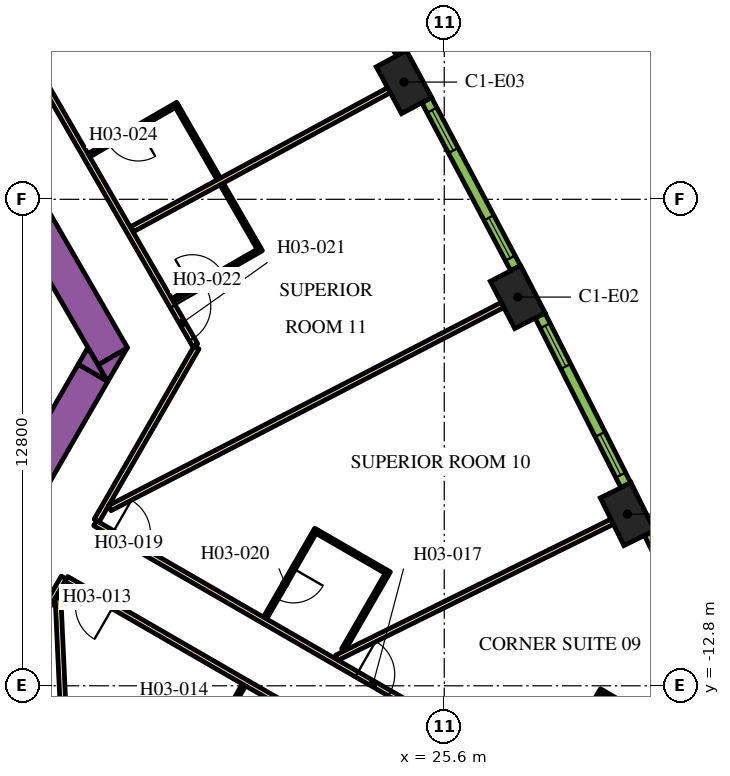
"""IFC4 building model, lengths in metres.
Left out: names, types, materials, properties, quantities, classifications, styles, units other than length and angle.
Written with IfcOpenShell. Run it as: python <this file> out.ifc"""

import sys

from ifc_helpers import new_model, si_unit, direction, frame, frame_2d, origin, origin_2d, place, context, subcontext, project, spatial, polyline, rectangle, outline, extrude, element, fill, save


model = new_model("IFC4")
c1 = context("Model", 3, precision=1e-05, world=origin(), true_north=direction((0.0, 1.0)))
c2 = subcontext(c1, "Body", "Model", "MODEL_VIEW")
j1 = project(units=[si_unit("LENGTHUNIT", "METRE"), si_unit("PLANEANGLEUNIT", "RADIAN")], contexts=[c1])
p1 = place(None, origin())
s1 = spatial("IfcSite", under=j1, at=p1, CompositionType="ELEMENT")
p2 = place(p1, origin())
s2 = spatial("IfcBuilding", under=s1, at=p2, CompositionType="ELEMENT")
p3 = place(p2, frame((0.0, 0.0, 51.0)))
s3 = spatial("IfcBuildingStorey", under=s2, at=p3, CompositionType="ELEMENT", Elevation=51.0)
for number, where, z_axis, x_axis in (
    (1, (30.421, -8.284, 0.0), (0.0, 0.0, 1.0), (-0.443, 0.897, 0.0)),
    (2, (27.533, -2.572, 0.0), (0.0, 0.0, 1.0), (-0.459, 0.888, 0.0)),
    (3, (24.54, 3.085, 0.0), (0.0, 0.0, 1.0), (-0.476, 0.88, 0.0)),
):
    element("IfcColumn", number, at=place(p3, frame(where, z_axis=z_axis, x_axis=x_axis)), inside=s3, PredefinedType="COLUMN", context=c2, shape_type="SweptSolid", body=[
        extrude(rectangle(XDim=1.4, YDim=0.9, at=origin_2d()), origin(), (0.0, 0.0, 1.0), 3.9),
    ])
p4 = place(p3, frame((6.776, 13.364, 0.0), z_axis=(0.0, 0.0, 1.0), x_axis=(0.500004177138, -0.8660229921, 0.0)))
e4 = element("IfcWall", 4, at=p4, inside=s3, PredefinedType="SOLIDWALL", context=c2, shape_type="SweptSolid", body=[
    extrude(rectangle(XDim=20.204, YDim=0.9, at=frame_2d((10.102, 0.0))), origin(), (0.0, 0.0, 1.0), 3.9),
])
p5 = place(p3, origin())
e5 = element("IfcWall", 5, at=p5, inside=s3, PredefinedType="SOLIDWALL", context=c2, shape_type="SweptSolid", body=[
    extrude(outline(polyline([(16.743, -4.8), (16.489, -4.36), (17.251, -3.92), (16.743, -4.8)])), origin(), (0.0, 0.0, 1.0), 3.9),
])
p6 = place(p3, frame((11.943, -12.214, 0.0), z_axis=(0.0, 0.0, 1.0), x_axis=(0.49998092645, 0.866036415623, 0.0)))
e6 = element("IfcWall", 6, at=p6, inside=s3, PredefinedType="SOLIDWALL", context=c2, shape_type="SweptSolid", body=[
    extrude(rectangle(XDim=8.83, YDim=0.9, at=frame_2d((4.415, 0.0))), origin(), (0.0, 0.0, 1.0), 3.9),
])
e7 = element("IfcWall", 7, at=p5, inside=s3, PredefinedType="SOLIDWALL", context=c2, shape_type="SweptSolid", body=[
    extrude(outline(polyline([(16.223, -3.9), (16.732, -4.78), (15.969, -4.34), (16.223, -3.9)])), origin(), (0.0, 0.0, 1.0), 3.9),
])
p7 = place(p3, frame((16.412, -8.523, 0.0), z_axis=(0.0, 0.0, 1.0), x_axis=(0.866022197818, -0.500005552856, 0.0)))
e8 = element("IfcWall", 8, at=p7, inside=s3, PredefinedType="PARTITIONING", context=c2, shape_type="SweptSolid", body=[
    extrude(rectangle(XDim=16.224, YDim=0.15, at=frame_2d((8.112, 0.0))), origin(), (0.0, 0.0, 1.0), 2.75),
])
p8 = place(p7, frame((7.949, 0.0, 0.0)))
e9 = element("IfcOpeningElement", 9, at=p8, cuts=e8, PredefinedType="OPENING", context=c2, shape_type="SweptSolid", body=[
    extrude(rectangle(XDim=1.0, YDim=2.1, at=frame_2d((0.5, 1.05))), frame((0.0, 0.085, 0.0), z_axis=(0.0, -1.0, 0.0), x_axis=(1.0, 0.0, 0.0)), (0.0, 0.0, 1.0), 0.17),
])
p9 = place(p7, frame((0.526, 0.0, 0.0)))
e10 = element("IfcOpeningElement", 10, at=p9, cuts=e8, PredefinedType="OPENING", context=c2, shape_type="SweptSolid", body=[
    extrude(rectangle(XDim=1.0, YDim=2.1, at=frame_2d((0.5, 1.05))), frame((0.0, 0.085, 0.0), z_axis=(0.0, -1.0, 0.0), x_axis=(1.0, 0.0, 0.0)), (0.0, 0.0, 1.0), 0.17),
])
p10 = place(p3, frame((19.081, -3.9, 0.0), z_axis=(0.0, 0.0, 1.0), x_axis=(-0.499974327079, -0.866040225545, 0.0)))
e11 = element("IfcWall", 11, at=p10, inside=s3, PredefinedType="PARTITIONING", context=c2, shape_type="SweptSolid", body=[
    extrude(rectangle(XDim=5.258, YDim=0.15, at=frame_2d((2.629, 0.0))), origin(), (0.0, 0.0, 1.0), 2.75),
])
p11 = place(p3, frame((6.163, 18.475, 0.0), z_axis=(0.0, 0.0, 1.0), x_axis=(0.500001317485, -0.866024643133, 0.0)))
e12 = element("IfcWall", 12, at=p11, inside=s3, PredefinedType="PARTITIONING", context=c2, shape_type="SweptSolid", body=[
    extrude(rectangle(XDim=25.767, YDim=0.15, at=frame_2d((12.883, 0.0))), origin(), (0.0, 0.0, 1.0), 2.75),
])
p12 = place(p11, frame((24.586, 0.0, 0.0)))
e13 = element("IfcOpeningElement", 13, at=p12, cuts=e12, PredefinedType="OPENING", context=c2, shape_type="SweptSolid", body=[
    extrude(rectangle(XDim=1.0, YDim=2.1, at=frame_2d((0.5, 1.05))), frame((0.0, 0.085, 0.0), z_axis=(0.0, -1.0, 0.0), x_axis=(1.0, 0.0, 0.0)), (0.0, 0.0, 1.0), 0.17),
])
p13 = place(p11, frame((13.144, 0.0, 0.0)))
e14 = element("IfcOpeningElement", 14, at=p13, cuts=e12, PredefinedType="OPENING", context=c2, shape_type="SweptSolid", body=[
    extrude(rectangle(XDim=1.0, YDim=2.1, at=frame_2d((0.5, 1.05))), frame((0.0, 0.085, 0.0), z_axis=(0.0, -1.0, 0.0), x_axis=(1.0, 0.0, 0.0)), (0.0, 0.0, 1.0), 0.17),
])
p14 = place(p11, frame((11.692, 0.0, 0.0)))
e15 = element("IfcOpeningElement", 15, at=p14, cuts=e12, PredefinedType="OPENING", context=c2, shape_type="SweptSolid", body=[
    extrude(rectangle(XDim=1.0, YDim=2.1, at=frame_2d((0.5, 1.05))), frame((0.0, 0.085, 0.0), z_axis=(0.0, -1.0, 0.0), x_axis=(1.0, 0.0, 0.0)), (0.0, 0.0, 1.0), 0.17),
])
p15 = place(p11, frame((0.572, 0.0, 0.0)))
e16 = element("IfcOpeningElement", 16, at=p15, cuts=e12, PredefinedType="OPENING", context=c2, shape_type="SweptSolid", body=[
    extrude(rectangle(XDim=1.0, YDim=2.1, at=frame_2d((0.5, 1.05))), frame((0.0, 0.085, 0.0), z_axis=(0.0, -1.0, 0.0), x_axis=(1.0, 0.0, 0.0)), (0.0, 0.0, 1.0), 0.17),
])
p16 = place(p3, frame((15.587, -9.952, 0.0), z_axis=(0.0, 0.0, 1.0), x_axis=(-0.500016618951, -0.866015808616, 0.0)))
e17 = element("IfcWall", 17, at=p16, inside=s3, PredefinedType="PARTITIONING", context=c2, shape_type="SweptSolid", body=[
    extrude(rectangle(XDim=5.268, YDim=0.15, at=frame_2d((2.634, 0.0))), origin(), (0.0, 0.0, 1.0), 2.75),
])
p17 = place(p3, frame((29.638, -18.064, 0.0), z_axis=(0.0, 0.0, 1.0), x_axis=(-0.866026175601, 0.499998663172, 0.0)))
e18 = element("IfcWall", 18, at=p17, inside=s3, PredefinedType="PARTITIONING", context=c2, shape_type="SweptSolid", body=[
    extrude(rectangle(XDim=16.144, YDim=0.15, at=frame_2d((8.072, 0.0))), origin(), (0.0, 0.0, 1.0), 2.75),
])
p18 = place(p17, frame((14.714, 0.0, 0.0)))
e19 = element("IfcOpeningElement", 19, at=p18, cuts=e18, PredefinedType="OPENING", context=c2, shape_type="SweptSolid", body=[
    extrude(rectangle(XDim=1.0, YDim=2.1, at=frame_2d((0.5, 1.05))), frame((0.0, 0.085, 0.0), z_axis=(0.0, -1.0, 0.0), x_axis=(1.0, 0.0, 0.0)), (0.0, 0.0, 1.0), 0.17),
])
p19 = place(p17, frame((7.275, 0.0, 0.0)))
e20 = element("IfcOpeningElement", 20, at=p19, cuts=e18, PredefinedType="OPENING", context=c2, shape_type="SweptSolid", body=[
    extrude(rectangle(XDim=1.0, YDim=2.1, at=frame_2d((0.5, 1.05))), frame((0.0, 0.085, 0.0), z_axis=(0.0, -1.0, 0.0), x_axis=(1.0, 0.0, 0.0)), (0.0, 0.0, 1.0), 0.17),
])
p20 = place(p3, frame((15.973, -22.109, 0.0), z_axis=(0.0, 0.0, 1.0), x_axis=(-0.046191717129, 0.998932592955, 0.0)))
e21 = element("IfcWall", 21, at=p20, inside=s3, PredefinedType="PARTITIONING", context=c2, shape_type="SweptSolid", body=[
    extrude(rectangle(XDim=11.638, YDim=0.15, at=frame_2d((5.819, 0.0))), origin(), (0.0, 0.0, 1.0), 2.75),
])
p21 = place(p3, frame((27.134, -2.779, 0.0), z_axis=(0.0, 0.0, 1.0), x_axis=(-0.8882049501, -0.459447457951, 0.0)))
e22 = element("IfcWall", 22, at=p21, inside=s3, PredefinedType="PARTITIONING", context=c2, shape_type="SweptSolid", body=[
    extrude(rectangle(XDim=11.638, YDim=0.15, at=frame_2d((5.819, 0.0))), origin(), (0.0, 0.0, 1.0), 2.75),
])
p22 = place(p3, frame((24.145, 2.871, 0.0), z_axis=(0.0, 0.0, 1.0), x_axis=(-0.879551725039, -0.475803281809, 0.0)))
e23 = element("IfcWall", 23, at=p22, inside=s3, PredefinedType="PARTITIONING", context=c2, shape_type="SweptSolid", body=[
    extrude(rectangle(XDim=7.688, YDim=0.15, at=frame_2d((3.844, 0.0))), origin(), (0.0, 0.0, 1.0), 2.75),
])
p23 = place(p3, frame((30.018, -8.483, 0.0), z_axis=(0.0, 0.0, 1.0), x_axis=(-0.896544505264, -0.44295366584, 0.0)))
e24 = element("IfcWall", 24, at=p23, inside=s3, PredefinedType="PARTITIONING", context=c2, shape_type="SweptSolid", body=[
    extrude(rectangle(XDim=8.079, YDim=0.15, at=frame_2d((4.04, 0.0))), origin(), (0.0, 0.0, 1.0), 2.75),
])
p24 = place(p3, frame((20.33, -12.777, 0.0), z_axis=(0.0, 0.0, 1.0), x_axis=(-0.500006934395, -0.866021400173, 0.0)))
e25 = element("IfcWall", 25, at=p24, inside=s3, PredefinedType="PARTITIONING", context=c2, shape_type="SweptSolid", body=[
    extrude(rectangle(XDim=2.6, YDim=0.1, at=frame_2d((1.3, 0.0))), origin(), (0.0, 0.0, 1.0), 2.75),
])
p25 = place(p24, frame((0.6, 0.0, 0.0)))
e26 = element("IfcOpeningElement", 26, at=p25, cuts=e25, PredefinedType="OPENING", context=c2, shape_type="SweptSolid", body=[
    extrude(rectangle(XDim=0.9, YDim=2.1, at=frame_2d((0.45, 1.05))), frame((0.0, 0.06, 0.0), z_axis=(0.0, -1.0, 0.0), x_axis=(1.0, 0.0, 0.0)), (0.0, 0.0, 1.0), 0.12),
])
p26 = place(p3, frame((29.752, -12.905, 0.0), z_axis=(0.0, 0.0, 1.0), x_axis=(-0.500049511043, -0.865996816683, 0.0)))
e27 = element("IfcWall", 27, at=p26, inside=s3, PredefinedType="PARTITIONING", context=c2, shape_type="SweptSolid", body=[
    extrude(rectangle(XDim=2.8, YDim=0.1, at=frame_2d((1.4, 0.0))), origin(), (0.0, 0.0, 1.0), 2.75),
])
p27 = place(p26, frame((1.3, 0.0, 0.0)))
e28 = element("IfcOpeningElement", 28, at=p27, cuts=e27, PredefinedType="OPENING", context=c2, shape_type="SweptSolid", body=[
    extrude(rectangle(XDim=0.9, YDim=2.1, at=frame_2d((0.45, 1.05))), frame((0.0, 0.06, 0.0), z_axis=(0.0, -1.0, 0.0), x_axis=(1.0, 0.0, 0.0)), (0.0, 0.0, 1.0), 0.12),
])
p28 = place(p3, frame((29.771, -12.973, 0.0), z_axis=(0.0, 0.0, 1.0), x_axis=(0.865980596518, -0.500077600433, 0.0)))
e29 = element("IfcWall", 29, at=p28, inside=s3, PredefinedType="PARTITIONING", context=c2, shape_type="SweptSolid", body=[
    extrude(rectangle(XDim=2.4, YDim=0.1, at=frame_2d((1.2, 0.0))), origin(), (0.0, 0.0, 1.0), 2.75),
])
p29 = place(p3, frame((22.234, -8.68, 0.0), z_axis=(0.0, 0.0, 1.0), x_axis=(-0.50000943426, -0.866019956843, 0.0)))
e30 = element("IfcWall", 30, at=p29, inside=s3, PredefinedType="PARTITIONING", context=c2, shape_type="SweptSolid", body=[
    extrude(rectangle(XDim=2.7, YDim=0.1, at=frame_2d((1.35, 0.0))), origin(), (0.0, 0.0, 1.0), 2.75),
])
p30 = place(p29, frame((1.2, 0.0, 0.0)))
e31 = element("IfcOpeningElement", 31, at=p30, cuts=e30, PredefinedType="OPENING", context=c2, shape_type="SweptSolid", body=[
    extrude(rectangle(XDim=0.9, YDim=2.1, at=frame_2d((0.45, 1.05))), frame((0.0, 0.06, 0.0), z_axis=(0.0, -1.0, 0.0), x_axis=(1.0, 0.0, 0.0)), (0.0, 0.0, 1.0), 0.12),
])
p31 = place(p3, frame((22.252, -8.748, 0.0), z_axis=(0.0, 0.0, 1.0), x_axis=(0.866009402589, -0.500027713859, 0.0)))
e32 = element("IfcWall", 32, at=p31, inside=s3, PredefinedType="PARTITIONING", context=c2, shape_type="SweptSolid", body=[
    extrude(rectangle(XDim=2.1, YDim=0.1, at=frame_2d((1.05, 0.0))), origin(), (0.0, 0.0, 1.0), 2.75),
])
p32 = place(p3, frame((22.944, -11.85, 0.0), z_axis=(0.0, 0.0, 1.0), x_axis=(0.499940577336, 0.866059708757, 0.0)))
e33 = element("IfcWall", 33, at=p32, inside=s3, PredefinedType="PARTITIONING", context=c2, shape_type="SweptSolid", body=[
    extrude(rectangle(XDim=2.39, YDim=0.1, at=frame_2d((1.195, 0.0))), origin(), (0.0, 0.0, 1.0), 2.75),
])
p33 = place(p3, frame((18.451, -2.657, 0.0), z_axis=(0.0, 0.0, 1.0), x_axis=(0.86599734893, 0.500048589285, 0.0)))
e34 = element("IfcWall", 34, at=p33, inside=s3, PredefinedType="PARTITIONING", context=c2, shape_type="SweptSolid", body=[
    extrude(rectangle(XDim=2.7, YDim=0.1, at=frame_2d((1.35, 0.0))), origin(), (0.0, 0.0, 1.0), 2.75),
])
p34 = place(p33, frame((0.6, 0.0, 0.0)))
e35 = element("IfcOpeningElement", 35, at=p34, cuts=e34, PredefinedType="OPENING", context=c2, shape_type="SweptSolid", body=[
    extrude(rectangle(XDim=0.9, YDim=2.1, at=frame_2d((0.45, 1.05))), frame((0.0, 0.06, 0.0), z_axis=(0.0, -1.0, 0.0), x_axis=(1.0, 0.0, 0.0)), (0.0, 0.0, 1.0), 0.12),
])
p35 = place(p3, frame((20.716, -1.281, 0.0), z_axis=(0.0, 0.0, 1.0), x_axis=(-0.499969367985, 0.866043088465, 0.0)))
e36 = element("IfcWall", 36, at=p35, inside=s3, PredefinedType="PARTITIONING", context=c2, shape_type="SweptSolid", body=[
    extrude(rectangle(XDim=1.94, YDim=0.1, at=frame_2d((0.97, 0.0))), origin(), (0.0, 0.0, 1.0), 2.75),
])
p36 = place(p3, frame((18.586, 2.509, 0.0), z_axis=(0.0, 0.0, 1.0), x_axis=(-0.866059108428, -0.4999416173, 0.0)))
e37 = element("IfcWall", 37, at=p36, inside=s3, PredefinedType="PARTITIONING", context=c2, shape_type="SweptSolid", body=[
    extrude(rectangle(XDim=2.7, YDim=0.1, at=frame_2d((1.35, 0.0))), origin(), (0.0, 0.0, 1.0), 2.75),
])
p37 = place(p36, frame((1.2, 0.0, 0.0)))
e38 = element("IfcOpeningElement", 38, at=p37, cuts=e37, PredefinedType="OPENING", context=c2, shape_type="SweptSolid", body=[
    extrude(rectangle(XDim=0.9, YDim=2.1, at=frame_2d((0.45, 1.05))), frame((0.0, 0.06, 0.0), z_axis=(0.0, -1.0, 0.0), x_axis=(1.0, 0.0, 0.0)), (0.0, 0.0, 1.0), 0.12),
])
p38 = place(p3, frame((18.567, 2.441, 0.0), z_axis=(0.0, 0.0, 1.0), x_axis=(0.499946605688, -0.86605622881, 0.0)))
e39 = element("IfcWall", 39, at=p38, inside=s3, PredefinedType="PARTITIONING", context=c2, shape_type="SweptSolid", body=[
    extrude(rectangle(XDim=2.2, YDim=0.1, at=frame_2d((1.1, 0.0))), origin(), (0.0, 0.0, 1.0), 2.75),
])
p39 = place(p3, frame((33.176, -13.29, 0.0), z_axis=(0.0, 0.0, 1.0), x_axis=(-0.434664499056, 0.900592456808, 0.0)))
e40 = element("IfcWall", 40, at=p39, inside=s3, PredefinedType="SOLIDWALL", context=c2, shape_type="SweptSolid", body=[
    extrude(rectangle(XDim=5.006, YDim=0.29, at=frame_2d((2.503, 0.0))), origin(), (0.0, 0.0, 1.0), 3.65),
])
p40 = place(p39, frame((0.265, 0.0, 0.9)))
e41 = element("IfcOpeningElement", 41, at=p40, cuts=e40, PredefinedType="OPENING", context=c2, shape_type="SweptSolid", body=[
    extrude(rectangle(XDim=1.2, YDim=2.15, at=frame_2d((0.6, 1.075))), frame((0.0, 0.155, 0.0), z_axis=(0.0, -1.0, 0.0), x_axis=(1.0, 0.0, 0.0)), (0.0, 0.0, 1.0), 0.31),
])
p41 = place(p39, frame((3.496, 0.0, 0.9)))
e42 = element("IfcOpeningElement", 42, at=p41, cuts=e40, PredefinedType="OPENING", context=c2, shape_type="SweptSolid", body=[
    extrude(rectangle(XDim=1.2, YDim=2.15, at=frame_2d((0.6, 1.075))), frame((0.0, 0.155, 0.0), z_axis=(0.0, -1.0, 0.0), x_axis=(1.0, 0.0, 0.0)), (0.0, 0.0, 1.0), 0.31),
])
p42 = place(p3, frame((30.377, -7.521, 0.0), z_axis=(0.0, 0.0, 1.0), x_axis=(-0.451233929645, 0.892405704115, 0.0)))
e43 = element("IfcWall", 43, at=p42, inside=s3, PredefinedType="SOLIDWALL", context=c2, shape_type="SweptSolid", body=[
    extrude(rectangle(XDim=4.998, YDim=0.29, at=frame_2d((2.499, 0.0))), origin(), (0.0, 0.0, 1.0), 3.65),
])
p43 = place(p42, frame((0.297, 0.0, 0.9)))
e44 = element("IfcOpeningElement", 44, at=p43, cuts=e43, PredefinedType="OPENING", context=c2, shape_type="SweptSolid", body=[
    extrude(rectangle(XDim=1.2, YDim=2.15, at=frame_2d((0.6, 1.075))), frame((0.0, 0.155, 0.0), z_axis=(0.0, -1.0, 0.0), x_axis=(1.0, 0.0, 0.0)), (0.0, 0.0, 1.0), 0.31),
])
p44 = place(p42, frame((3.501, 0.0, 0.9)))
e45 = element("IfcOpeningElement", 45, at=p44, cuts=e43, PredefinedType="OPENING", context=c2, shape_type="SweptSolid", body=[
    extrude(rectangle(XDim=1.2, YDim=2.15, at=frame_2d((0.6, 1.075))), frame((0.0, 0.155, 0.0), z_axis=(0.0, -1.0, 0.0), x_axis=(1.0, 0.0, 0.0)), (0.0, 0.0, 1.0), 0.31),
])
p45 = place(p3, frame((27.475, -1.81, 0.0), z_axis=(0.0, 0.0, 1.0), x_axis=(-0.467629620899, 0.883924509026, 0.0)))
e46 = element("IfcWall", 46, at=p45, inside=s3, PredefinedType="SOLIDWALL", context=c2, shape_type="SweptSolid", body=[
    extrude(rectangle(XDim=4.998, YDim=0.29, at=frame_2d((2.499, 0.0))), origin(), (0.0, 0.0, 1.0), 3.65),
])
p46 = place(p45, frame((0.297, 0.0, 0.9)))
e47 = element("IfcOpeningElement", 47, at=p46, cuts=e46, PredefinedType="OPENING", context=c2, shape_type="SweptSolid", body=[
    extrude(rectangle(XDim=1.2, YDim=2.15, at=frame_2d((0.6, 1.075))), frame((0.0, 0.155, 0.0), z_axis=(0.0, -1.0, 0.0), x_axis=(1.0, 0.0, 0.0)), (0.0, 0.0, 1.0), 0.31),
])
p47 = place(p45, frame((3.501, 0.0, 0.9)))
e48 = element("IfcOpeningElement", 48, at=p47, cuts=e46, PredefinedType="OPENING", context=c2, shape_type="SweptSolid", body=[
    extrude(rectangle(XDim=1.2, YDim=2.15, at=frame_2d((0.6, 1.075))), frame((0.0, 0.155, 0.0), z_axis=(0.0, -1.0, 0.0), x_axis=(1.0, 0.0, 0.0)), (0.0, 0.0, 1.0), 0.31),
])
p48 = place(p3, frame((24.468, 3.846, 0.0), z_axis=(0.0, 0.0, 1.0), x_axis=(-0.483912572871, 0.875116347589, 0.0)))
e49 = element("IfcWall", 49, at=p48, inside=s3, PredefinedType="SOLIDWALL", context=c2, shape_type="SweptSolid", body=[
    extrude(rectangle(XDim=4.998, YDim=0.29, at=frame_2d((2.499, 0.0))), origin(), (0.0, 0.0, 1.0), 3.65),
])
p49 = place(p48, frame((0.297, 0.0, 0.9)))
e50 = element("IfcOpeningElement", 50, at=p49, cuts=e49, PredefinedType="OPENING", context=c2, shape_type="SweptSolid", body=[
    extrude(rectangle(XDim=1.2, YDim=2.15, at=frame_2d((0.6, 1.075))), frame((0.0, 0.155, 0.0), z_axis=(0.0, -1.0, 0.0), x_axis=(1.0, 0.0, 0.0)), (0.0, 0.0, 1.0), 0.31),
])
p50 = place(p48, frame((3.501, 0.0, 0.9)))
e51 = element("IfcOpeningElement", 51, at=p50, cuts=e49, PredefinedType="OPENING", context=c2, shape_type="SweptSolid", body=[
    extrude(rectangle(XDim=1.2, YDim=2.15, at=frame_2d((0.6, 1.075))), frame((0.0, 0.155, 0.0), z_axis=(0.0, -1.0, 0.0), x_axis=(1.0, 0.0, 0.0)), (0.0, 0.0, 1.0), 0.31),
])
p51 = place(p18, origin())
e52 = element("IfcDoor", 52, at=p51, inside=s3, OperationType="SINGLE_SWING_RIGHT", PredefinedType="DOOR", context=c2, shape_type="SweptSolid", body=[
    extrude(rectangle(XDim=1.0, YDim=2.1, at=frame_2d((0.5, 1.05))), frame((0.0, 0.025, 0.0), z_axis=(0.0, -1.0, 0.0), x_axis=(1.0, 0.0, 0.0)), (0.0, 0.0, 1.0), 0.05),
])
fill(e19, e52)
p52 = place(p8, origin())
e53 = element("IfcDoor", 53, at=p52, inside=s3, OperationType="SINGLE_SWING_LEFT", PredefinedType="DOOR", context=c2, shape_type="SweptSolid", body=[
    extrude(rectangle(XDim=1.0, YDim=2.1, at=frame_2d((0.5, 1.05))), frame((0.0, 0.025, 0.0), z_axis=(0.0, -1.0, 0.0), x_axis=(1.0, 0.0, 0.0)), (0.0, 0.0, 1.0), 0.05),
])
fill(e9, e53)
p53 = place(p9, origin())
e54 = element("IfcDoor", 54, at=p53, inside=s3, OperationType="SINGLE_SWING_LEFT", PredefinedType="DOOR", context=c2, shape_type="SweptSolid", body=[
    extrude(rectangle(XDim=1.0, YDim=2.1, at=frame_2d((0.5, 1.05))), frame((0.0, 0.025, 0.0), z_axis=(0.0, -1.0, 0.0), x_axis=(1.0, 0.0, 0.0)), (0.0, 0.0, 1.0), 0.05),
])
fill(e10, e54)
p54 = place(p30, origin())
e55 = element("IfcDoor", 55, at=p54, inside=s3, OperationType="SINGLE_SWING_LEFT", PredefinedType="DOOR", context=c2, shape_type="SweptSolid", body=[
    extrude(rectangle(XDim=0.9, YDim=2.1, at=frame_2d((0.45, 1.05))), frame((0.0, 0.025, 0.0), z_axis=(0.0, -1.0, 0.0), x_axis=(1.0, 0.0, 0.0)), (0.0, 0.0, 1.0), 0.05),
])
fill(e31, e55)
p55 = place(p12, origin())
e56 = element("IfcDoor", 56, at=p55, inside=s3, OperationType="SINGLE_SWING_RIGHT", PredefinedType="DOOR", context=c2, shape_type="SweptSolid", body=[
    extrude(rectangle(XDim=1.0, YDim=2.1, at=frame_2d((0.5, 1.05))), frame((0.0, 0.025, 0.0), z_axis=(0.0, -1.0, 0.0), x_axis=(1.0, 0.0, 0.0)), (0.0, 0.0, 1.0), 0.05),
])
fill(e13, e56)
p56 = place(p34, origin())
e57 = element("IfcDoor", 57, at=p56, inside=s3, OperationType="SINGLE_SWING_LEFT", PredefinedType="DOOR", context=c2, shape_type="SweptSolid", body=[
    extrude(rectangle(XDim=0.9, YDim=2.1, at=frame_2d((0.45, 1.05))), frame((0.0, 0.025, 0.0), z_axis=(0.0, -1.0, 0.0), x_axis=(1.0, 0.0, 0.0)), (0.0, 0.0, 1.0), 0.05),
])
fill(e35, e57)
p57 = place(p37, origin())
e58 = element("IfcDoor", 58, at=p57, inside=s3, OperationType="SINGLE_SWING_RIGHT", PredefinedType="DOOR", context=c2, shape_type="SweptSolid", body=[
    extrude(rectangle(XDim=0.9, YDim=2.1, at=frame_2d((0.45, 1.05))), frame((0.0, 0.025, 0.0), z_axis=(0.0, -1.0, 0.0), x_axis=(1.0, 0.0, 0.0)), (0.0, 0.0, 1.0), 0.05),
])
fill(e38, e58)
p58 = place(p43, origin())
e59 = element("IfcWindow", 59, at=p58, inside=s3, PartitioningType="DOUBLE_PANEL_VERTICAL", PredefinedType="WINDOW", context=c2, shape_type="SweptSolid", body=[
    extrude(rectangle(XDim=1.2, YDim=2.15, at=frame_2d((0.6, 1.075))), frame((0.0, 0.015, 0.0), z_axis=(0.0, -1.0, 0.0), x_axis=(1.0, 0.0, 0.0)), (0.0, 0.0, 1.0), 0.06),
])
fill(e44, e59)
p59 = place(p44, origin())
e60 = element("IfcWindow", 60, at=p59, inside=s3, PartitioningType="DOUBLE_PANEL_VERTICAL", PredefinedType="WINDOW", context=c2, shape_type="SweptSolid", body=[
    extrude(rectangle(XDim=1.2, YDim=2.15, at=frame_2d((0.6, 1.075))), frame((0.0, 0.015, 0.0), z_axis=(0.0, -1.0, 0.0), x_axis=(1.0, 0.0, 0.0)), (0.0, 0.0, 1.0), 0.06),
])
fill(e45, e60)
p60 = place(p46, origin())
e61 = element("IfcWindow", 61, at=p60, inside=s3, PartitioningType="DOUBLE_PANEL_VERTICAL", PredefinedType="WINDOW", context=c2, shape_type="SweptSolid", body=[
    extrude(rectangle(XDim=1.2, YDim=2.15, at=frame_2d((0.6, 1.075))), frame((0.0, 0.015, 0.0), z_axis=(0.0, -1.0, 0.0), x_axis=(1.0, 0.0, 0.0)), (0.0, 0.0, 1.0), 0.06),
])
fill(e47, e61)
p61 = place(p47, origin())
e62 = element("IfcWindow", 62, at=p61, inside=s3, PartitioningType="DOUBLE_PANEL_VERTICAL", PredefinedType="WINDOW", context=c2, shape_type="SweptSolid", body=[
    extrude(rectangle(XDim=1.2, YDim=2.15, at=frame_2d((0.6, 1.075))), frame((0.0, 0.015, 0.0), z_axis=(0.0, -1.0, 0.0), x_axis=(1.0, 0.0, 0.0)), (0.0, 0.0, 1.0), 0.06),
])
fill(e48, e62)
save(model, sys.argv[1])
